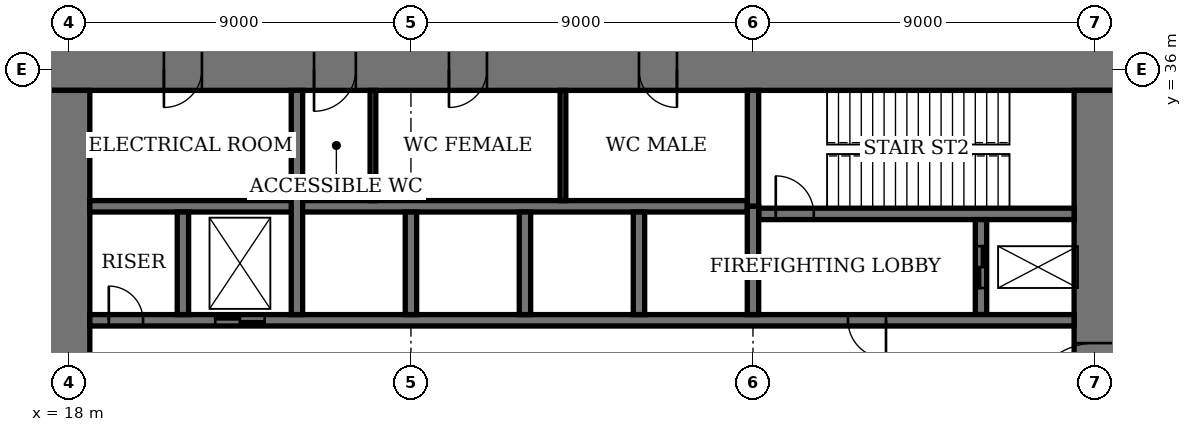
"""IFC4 building model, lengths in metres.
Left out: names, types, materials, properties, quantities, classifications, styles, units other than length and angle.
Written with IfcOpenShell. Run it as: python <this file> out.ifc"""

import sys

from ifc_helpers import new_model, si_unit, direction, frame, frame_2d, origin, place, context, subcontext, project, spatial, rectangle, extrude, element, fill, save


model = new_model("IFC4")
c1 = context("Model", 3, precision=1e-05, world=origin(), true_north=direction((0.0, 1.0)))
c2 = subcontext(c1, "Body", "Model", "MODEL_VIEW")
j1 = project(units=[si_unit("LENGTHUNIT", "METRE"), si_unit("PLANEANGLEUNIT", "RADIAN")], contexts=[c1])
p1 = place(None, origin())
s1 = spatial("IfcSite", under=j1, at=p1, CompositionType="ELEMENT")
p2 = place(p1, origin())
s2 = spatial("IfcBuilding", under=s1, at=p2, CompositionType="ELEMENT")
p3 = place(p2, frame((0.0, 0.0, -5.0)))
s3 = spatial("IfcBuildingStorey", under=s2, at=p3, CompositionType="ELEMENT", Elevation=-5.0)
p4 = place(p3, frame((45.55, 36.0, 0.0), z_axis=(0.0, 0.0, 1.0), x_axis=(-1.0, 0.0, 0.0)))
e1 = element("IfcWall", 1, at=p4, inside=s3, PredefinedType="SHEAR", context=c2, shape_type="SweptSolid", body=[
    extrude(rectangle(XDim=28.1, YDim=1.1, at=frame_2d((14.05, 0.0))), origin(), (0.0, 0.0, 1.0), 5.0),
])
p5 = place(p4, frame((11.55, 0.0, 0.0)))
e2 = element("IfcOpeningElement", 2, at=p5, cuts=e1, PredefinedType="OPENING", context=c2, shape_type="SweptSolid", body=[
    extrude(rectangle(XDim=1.0, YDim=2.4, at=frame_2d((0.5, 1.2))), frame((0.0, 0.56, 0.0), z_axis=(0.0, -1.0, 0.0), x_axis=(1.0, 0.0, 0.0)), (0.0, 0.0, 1.0), 1.12),
])
p6 = place(p4, frame((16.55, 0.0, 0.0)))
e3 = element("IfcOpeningElement", 3, at=p6, cuts=e1, PredefinedType="OPENING", context=c2, shape_type="SweptSolid", body=[
    extrude(rectangle(XDim=1.0, YDim=2.4, at=frame_2d((0.5, 1.2))), frame((0.0, 0.56, 0.0), z_axis=(0.0, -1.0, 0.0), x_axis=(1.0, 0.0, 0.0)), (0.0, 0.0, 1.0), 1.12),
])
p7 = place(p4, frame((20.0, 0.0, 0.0)))
e4 = element("IfcOpeningElement", 4, at=p7, cuts=e1, PredefinedType="OPENING", context=c2, shape_type="SweptSolid", body=[
    extrude(rectangle(XDim=1.1, YDim=2.4, at=frame_2d((0.55, 1.2))), frame((0.0, 0.56, 0.0), z_axis=(0.0, -1.0, 0.0), x_axis=(1.0, 0.0, 0.0)), (0.0, 0.0, 1.0), 1.12),
])
p8 = place(p4, frame((24.05, 0.0, 0.0)))
e5 = element("IfcOpeningElement", 5, at=p8, cuts=e1, PredefinedType="OPENING", context=c2, shape_type="SweptSolid", body=[
    extrude(rectangle(XDim=1.0, YDim=2.4, at=frame_2d((0.5, 1.2))), frame((0.0, 0.56, 0.0), z_axis=(0.0, -1.0, 0.0), x_axis=(1.0, 0.0, 0.0)), (0.0, 0.0, 1.0), 1.12),
])
p9 = place(p3, frame((18.0, 35.45, 0.0), z_axis=(0.0, 0.0, 1.0), x_axis=(0.0, -1.0, 0.0)))
e6 = element("IfcWall", 6, at=p9, inside=s3, PredefinedType="SHEAR", context=c2, shape_type="SweptSolid", body=[
    extrude(rectangle(XDim=16.9, YDim=1.1, at=frame_2d((8.45, 0.0))), origin(), (0.0, 0.0, 1.0), 5.0),
])
p10 = place(p9, frame((8.45, 0.0, 0.0)))
e7 = element("IfcOpeningElement", 7, at=p10, cuts=e6, PredefinedType="OPENING", context=c2, shape_type="SweptSolid", body=[
    extrude(rectangle(XDim=1.8, YDim=2.4, at=frame_2d((0.9, 1.2))), frame((0.0, 0.56, 0.0), z_axis=(0.0, -1.0, 0.0), x_axis=(1.0, 0.0, 0.0)), (0.0, 0.0, 1.0), 1.12),
])
p11 = place(p3, frame((45.0, 18.55, 0.0), z_axis=(0.0, 0.0, 1.0), x_axis=(0.0, 1.0, 0.0)))
e8 = element("IfcWall", 8, at=p11, inside=s3, PredefinedType="SHEAR", context=c2, shape_type="SweptSolid", body=[
    extrude(rectangle(XDim=16.9, YDim=1.1, at=frame_2d((8.45, 0.0))), origin(), (0.0, 0.0, 1.0), 5.0),
])
p12 = place(p11, frame((8.45, 0.0, 0.0)))
e9 = element("IfcOpeningElement", 9, at=p12, cuts=e8, PredefinedType="OPENING", context=c2, shape_type="SweptSolid", body=[
    extrude(rectangle(XDim=1.8, YDim=2.4, at=frame_2d((0.9, 1.2))), frame((0.0, 0.56, 0.0), z_axis=(0.0, -1.0, 0.0), x_axis=(1.0, 0.0, 0.0)), (0.0, 0.0, 1.0), 1.12),
])
p13 = place(p3, frame((36.15, 32.2, 0.0), z_axis=(0.0, 0.0, 1.0), x_axis=(1.0, 0.0, 0.0)))
e10 = element("IfcWall", 10, at=p13, inside=s3, PredefinedType="SHEAR", context=c2, shape_type="SweptSolid", body=[
    extrude(rectangle(XDim=8.3, YDim=0.3, at=frame_2d((4.15, 0.0))), origin(), (0.0, 0.0, 1.0), 5.0),
])
p14 = place(p13, frame((0.45, 0.0, 0.0)))
e11 = element("IfcOpeningElement", 11, at=p14, cuts=e10, PredefinedType="OPENING", context=c2, shape_type="SweptSolid", body=[
    extrude(rectangle(XDim=1.0, YDim=2.4, at=frame_2d((0.5, 1.2))), frame((0.0, 0.16, 0.0), z_axis=(0.0, -1.0, 0.0), x_axis=(1.0, 0.0, 0.0)), (0.0, 0.0, 1.0), 0.32),
])
p15 = place(p3, frame((36.0, 32.4, 0.0), z_axis=(0.0, 0.0, 1.0), x_axis=(0.0, 1.0, 0.0)))
e12 = element("IfcWall", 12, at=p15, inside=s3, PredefinedType="SHEAR", context=c2, shape_type="SweptSolid", body=[
    extrude(rectangle(XDim=3.05, YDim=0.3, at=frame_2d((1.525, 0.0))), origin(), (0.0, 0.0, 1.0), 5.0),
])
p16 = place(p3, frame((42.0, 29.55, 0.0), z_axis=(0.0, 0.0, 1.0), x_axis=(0.0, 1.0, 0.0)))
e13 = element("IfcWall", 13, at=p16, inside=s3, PredefinedType="SHEAR", context=c2, shape_type="SweptSolid", body=[
    extrude(rectangle(XDim=2.5, YDim=0.3, at=frame_2d((1.25, 0.0))), origin(), (0.0, 0.0, 1.0), 5.0),
])
p17 = place(p16, frame((0.7, 0.0, 0.0)))
e14 = element("IfcOpeningElement", 14, at=p17, cuts=e13, PredefinedType="OPENING", context=c2, shape_type="SweptSolid", body=[
    extrude(rectangle(XDim=1.1, YDim=2.4, at=frame_2d((0.55, 1.2))), frame((0.0, 0.16, 0.0), z_axis=(0.0, -1.0, 0.0), x_axis=(1.0, 0.0, 0.0)), (0.0, 0.0, 1.0), 0.32),
])
p18 = place(p3, frame((18.55, 29.4, 0.0), z_axis=(0.0, 0.0, 1.0), x_axis=(1.0, 0.0, 0.0)))
e15 = element("IfcWall", 15, at=p18, inside=s3, PredefinedType="SHEAR", context=c2, shape_type="SweptSolid", body=[
    extrude(rectangle(XDim=25.9, YDim=0.3, at=frame_2d((12.95, 0.0))), origin(), (0.0, 0.0, 1.0), 5.0),
])
p19 = place(p18, frame((19.95, 0.0, 0.0)))
e16 = element("IfcOpeningElement", 16, at=p19, cuts=e15, PredefinedType="OPENING", context=c2, shape_type="SweptSolid", body=[
    extrude(rectangle(XDim=1.0, YDim=2.4, at=frame_2d((0.5, 1.2))), frame((0.0, 0.16, 0.0), z_axis=(0.0, -1.0, 0.0), x_axis=(1.0, 0.0, 0.0)), (0.0, 0.0, 1.0), 0.32),
])
p20 = place(p18, frame((0.5, 0.0, 0.0)))
e17 = element("IfcOpeningElement", 17, at=p20, cuts=e15, PredefinedType="OPENING", context=c2, shape_type="SweptSolid", body=[
    extrude(rectangle(XDim=0.9, YDim=2.1, at=frame_2d((0.45, 1.05))), frame((0.0, 0.16, 0.0), z_axis=(0.0, -1.0, 0.0), x_axis=(1.0, 0.0, 0.0)), (0.0, 0.0, 1.0), 0.32),
])
p21 = place(p18, frame((3.3, 0.0, 0.0)))
e18 = element("IfcOpeningElement", 18, at=p21, cuts=e15, PredefinedType="OPENING", context=c2, shape_type="SweptSolid", body=[
    extrude(rectangle(XDim=1.3, YDim=2.4, at=frame_2d((0.65, 1.2))), frame((0.0, 0.16, 0.0), z_axis=(0.0, -1.0, 0.0), x_axis=(1.0, 0.0, 0.0)), (0.0, 0.0, 1.0), 0.32),
])
p22 = place(p3, frame((18.55, 32.4, 0.0), z_axis=(0.0, 0.0, 1.0), x_axis=(1.0, 0.0, 0.0)))
e19 = element("IfcWall", 19, at=p22, inside=s3, PredefinedType="SHEAR", context=c2, shape_type="SweptSolid", body=[
    extrude(rectangle(XDim=17.3, YDim=0.3, at=frame_2d((8.65, 0.0))), origin(), (0.0, 0.0, 1.0), 5.0),
])
for number, where, z_axis, x_axis in (
    (20, (33.0, 29.55, 0.0), (0.0, 0.0, 1.0), (0.0, 1.0, 0.0)),
    (21, (30.0, 29.55, 0.0), (0.0, 0.0, 1.0), (0.0, 1.0, 0.0)),
    (22, (27.0, 29.55, 0.0), (0.0, 0.0, 1.0), (0.0, 1.0, 0.0)),
):
    element("IfcWall", number, at=place(p3, frame(where, z_axis=z_axis, x_axis=x_axis)), inside=s3, PredefinedType="SHEAR", context=c2, shape_type="SweptSolid", body=[
        extrude(rectangle(XDim=2.7, YDim=0.3, at=frame_2d((1.35, 0.0))), origin(), (0.0, 0.0, 1.0), 5.0),
    ])
p23 = place(p3, frame((24.0, 29.55, 0.0), z_axis=(0.0, 0.0, 1.0), x_axis=(0.0, 1.0, 0.0)))
e23 = element("IfcWall", 23, at=p23, inside=s3, PredefinedType="SHEAR", context=c2, shape_type="SweptSolid", body=[
    extrude(rectangle(XDim=5.9, YDim=0.3, at=frame_2d((2.95, 0.0))), origin(), (0.0, 0.0, 1.0), 5.0),
])
p24 = place(p3, frame((21.0, 29.55, 0.0), z_axis=(0.0, 0.0, 1.0), x_axis=(0.0, 1.0, 0.0)))
e24 = element("IfcWall", 24, at=p24, inside=s3, PredefinedType="SHEAR", context=c2, shape_type="SweptSolid", body=[
    extrude(rectangle(XDim=2.7, YDim=0.3, at=frame_2d((1.35, 0.0))), origin(), (0.0, 0.0, 1.0), 5.0),
])
p25 = place(p3, frame((36.0, 29.55, 0.0), z_axis=(0.0, 0.0, 1.0), x_axis=(0.0, 1.0, 0.0)))
e25 = element("IfcWall", 25, at=p25, inside=s3, PredefinedType="SHEAR", context=c2, shape_type="SweptSolid", body=[
    extrude(rectangle(XDim=2.85, YDim=0.3, at=frame_2d((1.425, 0.0))), origin(), (0.0, 0.0, 1.0), 5.0),
])
for number, where, z_axis, x_axis in (
    (26, (31.0, 32.55, 0.0), (0.0, 0.0, 1.0), (0.0, 1.0, 0.0)),
    (27, (26.0, 32.55, 0.0), (0.0, 0.0, 1.0), (0.0, 1.0, 0.0)),
):
    element("IfcWall", number, at=place(p3, frame(where, z_axis=z_axis, x_axis=x_axis)), inside=s3, PredefinedType="PARTITIONING", context=c2, shape_type="SweptSolid", body=[
        extrude(rectangle(XDim=2.9, YDim=0.15, at=frame_2d((1.45, 0.0))), origin(), (0.0, 0.0, 1.0), 4.7),
    ])
p26 = place(p12, origin())
e28 = element("IfcDoor", 28, at=p26, inside=s3, OperationType="DOUBLE_DOOR_DOUBLE_SWING", PredefinedType="DOOR", context=c2, shape_type="SweptSolid", body=[
    extrude(rectangle(XDim=1.8, YDim=2.4, at=frame_2d((0.9, 1.2))), frame((0.0, 0.03, 0.0), z_axis=(0.0, -1.0, 0.0), x_axis=(1.0, 0.0, 0.0)), (0.0, 0.0, 1.0), 0.06),
    extrude(rectangle(XDim=0.04, YDim=2.4, at=frame_2d((0.02, 1.2))), frame((0.0, 0.55, 0.0), z_axis=(0.0, -1.0, 0.0), x_axis=(1.0, 0.0, 0.0)), (0.0, 0.0, 1.0), 1.1),
    extrude(rectangle(XDim=0.04, YDim=2.4, at=frame_2d((1.78, 1.2))), frame((0.0, 0.55, 0.0), z_axis=(0.0, -1.0, 0.0), x_axis=(1.0, 0.0, 0.0)), (0.0, 0.0, 1.0), 1.1),
    extrude(rectangle(XDim=1.8, YDim=0.04, at=frame_2d((0.9, 2.38))), frame((0.0, 0.55, 0.0), z_axis=(0.0, -1.0, 0.0), x_axis=(1.0, 0.0, 0.0)), (0.0, 0.0, 1.0), 1.1),
])
fill(e9, e28)
p27 = place(p5, origin())
e29 = element("IfcDoor", 29, at=p27, inside=s3, OperationType="SINGLE_SWING_RIGHT", PredefinedType="DOOR", context=c2, shape_type="SweptSolid", body=[
    extrude(rectangle(XDim=1.0, YDim=2.4, at=frame_2d((0.5, 1.2))), frame((0.0, 0.025, 0.0), z_axis=(0.0, -1.0, 0.0), x_axis=(1.0, 0.0, 0.0)), (0.0, 0.0, 1.0), 0.05),
    extrude(rectangle(XDim=0.04, YDim=2.4, at=frame_2d((0.02, 1.2))), frame((0.0, 0.4, 0.0), z_axis=(0.0, -1.0, 0.0), x_axis=(1.0, 0.0, 0.0)), (0.0, 0.0, 1.0), 0.8),
    extrude(rectangle(XDim=0.04, YDim=2.4, at=frame_2d((0.98, 1.2))), frame((0.0, 0.4, 0.0), z_axis=(0.0, -1.0, 0.0), x_axis=(1.0, 0.0, 0.0)), (0.0, 0.0, 1.0), 0.8),
    extrude(rectangle(XDim=1.0, YDim=0.04, at=frame_2d((0.5, 2.38))), frame((0.0, 0.4, 0.0), z_axis=(0.0, -1.0, 0.0), x_axis=(1.0, 0.0, 0.0)), (0.0, 0.0, 1.0), 0.8),
])
fill(e2, e29)
p28 = place(p6, origin())
e30 = element("IfcDoor", 30, at=p28, inside=s3, OperationType="SINGLE_SWING_LEFT", PredefinedType="DOOR", context=c2, shape_type="SweptSolid", body=[
    extrude(rectangle(XDim=1.0, YDim=2.4, at=frame_2d((0.5, 1.2))), frame((0.0, 0.025, 0.0), z_axis=(0.0, -1.0, 0.0), x_axis=(1.0, 0.0, 0.0)), (0.0, 0.0, 1.0), 0.05),
    extrude(rectangle(XDim=0.04, YDim=2.4, at=frame_2d((0.02, 1.2))), frame((0.0, 0.4, 0.0), z_axis=(0.0, -1.0, 0.0), x_axis=(1.0, 0.0, 0.0)), (0.0, 0.0, 1.0), 0.8),
    extrude(rectangle(XDim=0.04, YDim=2.4, at=frame_2d((0.98, 1.2))), frame((0.0, 0.4, 0.0), z_axis=(0.0, -1.0, 0.0), x_axis=(1.0, 0.0, 0.0)), (0.0, 0.0, 1.0), 0.8),
    extrude(rectangle(XDim=1.0, YDim=0.04, at=frame_2d((0.5, 2.38))), frame((0.0, 0.4, 0.0), z_axis=(0.0, -1.0, 0.0), x_axis=(1.0, 0.0, 0.0)), (0.0, 0.0, 1.0), 0.8),
])
fill(e3, e30)
p29 = place(p7, origin())
e31 = element("IfcDoor", 31, at=p29, inside=s3, OperationType="SINGLE_SWING_LEFT", PredefinedType="DOOR", context=c2, shape_type="SweptSolid", body=[
    extrude(rectangle(XDim=1.1, YDim=2.4, at=frame_2d((0.55, 1.2))), frame((0.0, 0.025, 0.0), z_axis=(0.0, -1.0, 0.0), x_axis=(1.0, 0.0, 0.0)), (0.0, 0.0, 1.0), 0.05),
    extrude(rectangle(XDim=0.04, YDim=2.4, at=frame_2d((0.02, 1.2))), frame((0.0, 0.44, 0.0), z_axis=(0.0, -1.0, 0.0), x_axis=(1.0, 0.0, 0.0)), (0.0, 0.0, 1.0), 0.88),
    extrude(rectangle(XDim=0.04, YDim=2.4, at=frame_2d((1.08, 1.2))), frame((0.0, 0.44, 0.0), z_axis=(0.0, -1.0, 0.0), x_axis=(1.0, 0.0, 0.0)), (0.0, 0.0, 1.0), 0.88),
    extrude(rectangle(XDim=1.1, YDim=0.04, at=frame_2d((0.55, 2.38))), frame((0.0, 0.44, 0.0), z_axis=(0.0, -1.0, 0.0), x_axis=(1.0, 0.0, 0.0)), (0.0, 0.0, 1.0), 0.88),
])
fill(e4, e31)
p30 = place(p8, origin())
e32 = element("IfcDoor", 32, at=p30, inside=s3, OperationType="SINGLE_SWING_LEFT", PredefinedType="DOOR", context=c2, shape_type="SweptSolid", body=[
    extrude(rectangle(XDim=1.0, YDim=2.4, at=frame_2d((0.5, 1.2))), frame((0.0, 0.025, 0.0), z_axis=(0.0, -1.0, 0.0), x_axis=(1.0, 0.0, 0.0)), (0.0, 0.0, 1.0), 0.05),
    extrude(rectangle(XDim=0.04, YDim=2.4, at=frame_2d((0.02, 1.2))), frame((0.0, 0.4, 0.0), z_axis=(0.0, -1.0, 0.0), x_axis=(1.0, 0.0, 0.0)), (0.0, 0.0, 1.0), 0.8),
    extrude(rectangle(XDim=0.04, YDim=2.4, at=frame_2d((0.98, 1.2))), frame((0.0, 0.4, 0.0), z_axis=(0.0, -1.0, 0.0), x_axis=(1.0, 0.0, 0.0)), (0.0, 0.0, 1.0), 0.8),
    extrude(rectangle(XDim=1.0, YDim=0.04, at=frame_2d((0.5, 2.38))), frame((0.0, 0.4, 0.0), z_axis=(0.0, -1.0, 0.0), x_axis=(1.0, 0.0, 0.0)), (0.0, 0.0, 1.0), 0.8),
])
fill(e5, e32)
p31 = place(p14, origin())
e33 = element("IfcDoor", 33, at=p31, inside=s3, OperationType="SINGLE_SWING_RIGHT", PredefinedType="DOOR", context=c2, shape_type="SweptSolid", body=[
    extrude(rectangle(XDim=1.0, YDim=2.4, at=frame_2d((0.5, 1.2))), frame((0.0, 0.03, 0.0), z_axis=(0.0, -1.0, 0.0), x_axis=(1.0, 0.0, 0.0)), (0.0, 0.0, 1.0), 0.06),
])
fill(e11, e33)
p32 = place(p19, origin())
e34 = element("IfcDoor", 34, at=p32, inside=s3, OperationType="SINGLE_SWING_RIGHT", PredefinedType="DOOR", context=c2, shape_type="SweptSolid", body=[
    extrude(rectangle(XDim=1.0, YDim=2.4, at=frame_2d((0.5, 1.2))), frame((0.0, 0.03, 0.0), z_axis=(0.0, -1.0, 0.0), x_axis=(1.0, 0.0, 0.0)), (0.0, 0.0, 1.0), 0.06),
])
fill(e16, e34)
p33 = place(p20, origin())
e35 = element("IfcDoor", 35, at=p33, inside=s3, OperationType="SINGLE_SWING_RIGHT", PredefinedType="DOOR", context=c2, shape_type="SweptSolid", body=[
    extrude(rectangle(XDim=0.9, YDim=2.1, at=frame_2d((0.45, 1.05))), frame((0.0, 0.03, 0.0), z_axis=(0.0, -1.0, 0.0), x_axis=(1.0, 0.0, 0.0)), (0.0, 0.0, 1.0), 0.06),
])
fill(e17, e35)
p34 = place(p21, origin())
e36 = element("IfcDoor", 36, at=p34, inside=s3, OperationType="DOUBLE_DOOR_SLIDING", PredefinedType="DOOR", context=c2, shape_type="SweptSolid", body=[
    extrude(rectangle(XDim=1.3, YDim=2.4, at=frame_2d((0.65, 1.2))), frame((0.0, 0.02, 0.0), z_axis=(0.0, -1.0, 0.0), x_axis=(1.0, 0.0, 0.0)), (0.0, 0.0, 1.0), 0.04),
])
fill(e18, e36)
p35 = place(p17, origin())
e37 = element("IfcDoor", 37, at=p35, inside=s3, OperationType="DOUBLE_DOOR_SLIDING", PredefinedType="DOOR", context=c2, shape_type="SweptSolid", body=[
    extrude(rectangle(XDim=1.1, YDim=2.4, at=frame_2d((0.55, 1.2))), frame((0.0, 0.03, 0.0), z_axis=(0.0, -1.0, 0.0), x_axis=(1.0, 0.0, 0.0)), (0.0, 0.0, 1.0), 0.06),
])
fill(e14, e37)
save(model, sys.argv[1])
